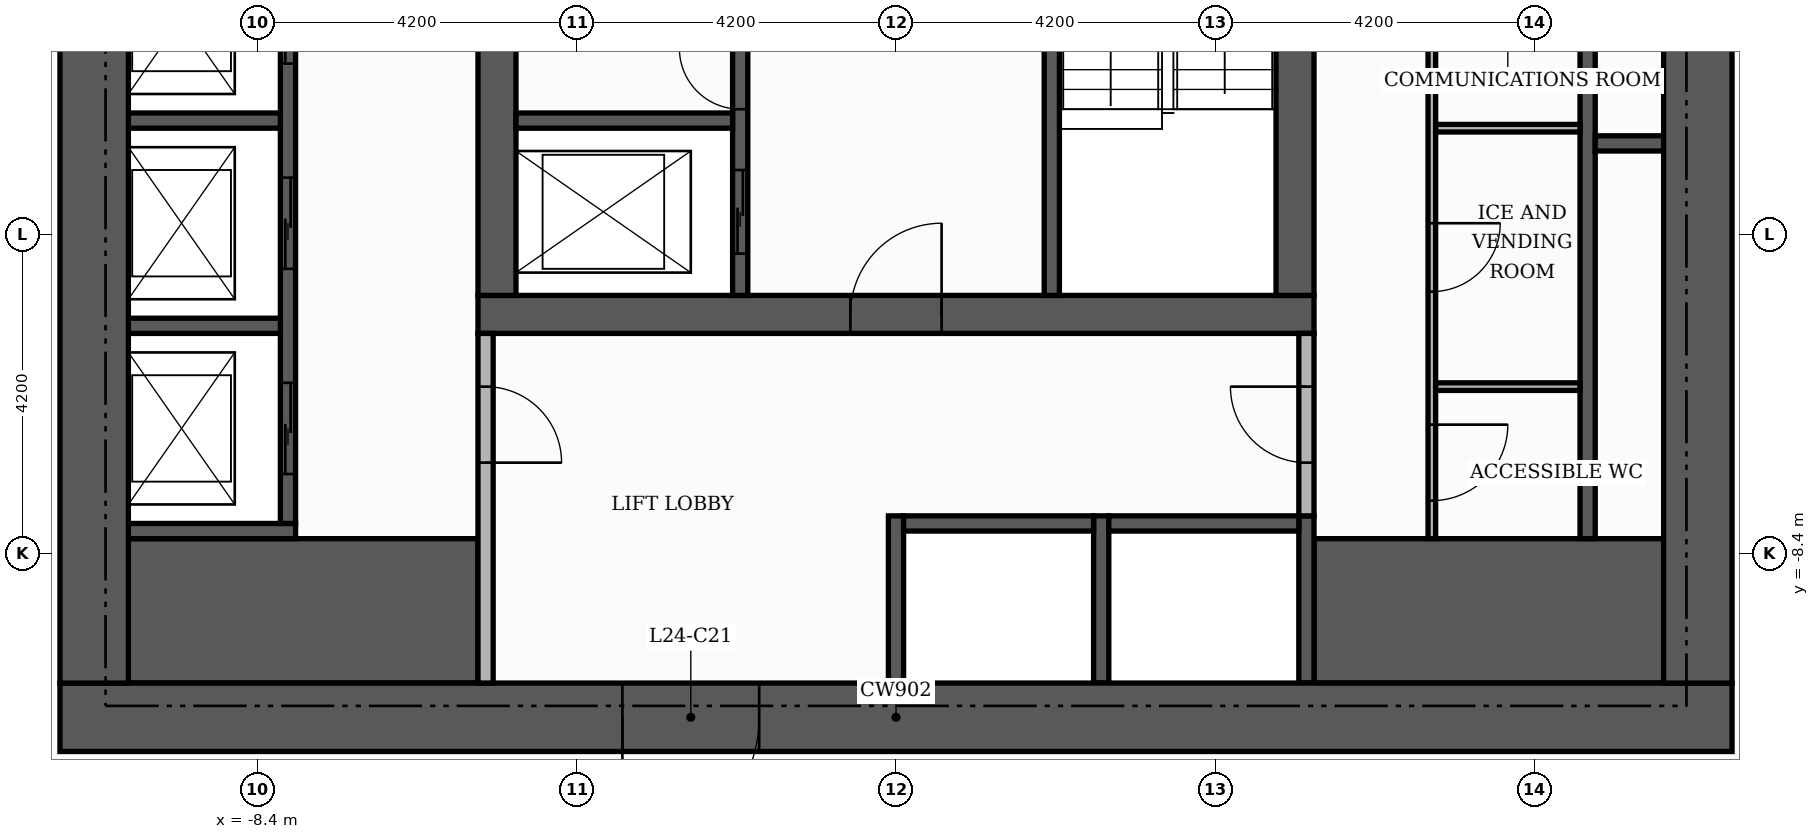
"""IFC4 building model, lengths in metres.
Left out: names, types, materials, properties, quantities, classifications, styles, units other than length and angle.
Written with IfcOpenShell. Run it as: python <this file> out.ifc"""

import sys

from ifc_helpers import new_model, si_unit, direction, frame, frame_2d, origin, place, context, subcontext, project, spatial, rectangle, extrude, element, fill, save


model = new_model("IFC4")
c1 = context("Model", 3, precision=1e-05, world=origin(), true_north=direction((0.0, 1.0)))
c2 = subcontext(c1, "Body", "Model", "MODEL_VIEW")
j1 = project(units=[si_unit("LENGTHUNIT", "METRE"), si_unit("PLANEANGLEUNIT", "RADIAN")], contexts=[c1])
p1 = place(None, origin())
s1 = spatial("IfcSite", under=j1, at=p1, CompositionType="ELEMENT")
p2 = place(p1, origin())
s2 = spatial("IfcBuilding", under=s1, at=p2, CompositionType="ELEMENT")
p3 = place(p2, frame((0.0, 0.0, 102.6)))
s3 = spatial("IfcBuildingStorey", under=s2, at=p3, CompositionType="ELEMENT", Elevation=102.6)
p4 = place(p3, frame((-5.5, -5.25, 0.0), z_axis=(0.0, 0.0, 1.0), x_axis=(1.0, 0.0, 0.0)))
e1 = element("IfcWall", 1, at=p4, inside=s3, PredefinedType="SHEAR", context=c2, shape_type="SweptSolid", body=[
    extrude(rectangle(XDim=11.0, YDim=0.5, at=frame_2d((5.5, 0.0))), origin(), (0.0, 0.0, 1.0), 3.48),
])
p5 = place(p4, frame((4.9, 0.0, 0.0)))
e2 = element("IfcOpeningElement", 2, at=p5, cuts=e1, PredefinedType="OPENING", context=c2, shape_type="SweptSolid", body=[
    extrude(rectangle(XDim=1.2, YDim=2.1, at=frame_2d((0.6, 1.05))), frame((0.0, 0.26, 0.0), z_axis=(0.0, -1.0, 0.0), x_axis=(1.0, 0.0, 0.0)), (0.0, 0.0, 1.0), 0.52),
])
for number, where, z_axis, x_axis in (
    (3, (-5.25, -5.0, 0.0), (0.0, 0.0, 1.0), (0.0, 1.0, 0.0)),
    (4, (5.25, -5.0, 0.0), (0.0, 0.0, 1.0), (0.0, 1.0, 0.0)),
):
    element("IfcWall", number, at=place(p3, frame(where, z_axis=z_axis, x_axis=x_axis)), inside=s3, PredefinedType="SHEAR", context=c2, shape_type="SweptSolid", body=[
        extrude(rectangle(XDim=10.5, YDim=0.5, at=frame_2d((5.25, 0.0))), origin(), (0.0, 0.0, 1.0), 3.48),
    ])
for number, where, z_axis, x_axis in (
    (5, (-10.1, -9.15, 0.0), (0.0, 0.0, 1.0), (1.0, 0.0, 0.0)),
    (6, (5.5, -9.15, 0.0), (0.0, 0.0, 1.0), (1.0, 0.0, 0.0)),
):
    element("IfcWall", number, at=place(p3, frame(where, z_axis=z_axis, x_axis=x_axis)), inside=s3, PredefinedType="SHEAR", context=c2, shape_type="SweptSolid", body=[
        extrude(rectangle(XDim=4.6, YDim=1.9, at=frame_2d((2.3, 0.0))), origin(), (0.0, 0.0, 1.0), 3.48),
    ])
p6 = place(p3, frame((2.05, -5.0, 0.0), z_axis=(0.0, 0.0, 1.0), x_axis=(0.0, 1.0, 0.0)))
e7 = element("IfcWall", 7, at=p6, inside=s3, PredefinedType="SHEAR", context=c2, shape_type="SweptSolid", body=[
    extrude(rectangle(XDim=6.6, YDim=0.2, at=frame_2d((3.3, 0.0))), origin(), (0.0, 0.0, 1.0), 3.48),
])
p7 = place(p6, frame((5.25, 0.0, 0.0)))
e8 = element("IfcOpeningElement", 8, at=p7, cuts=e7, PredefinedType="OPENING", context=c2, shape_type="SweptSolid", body=[
    extrude(rectangle(XDim=1.0, YDim=2.1, at=frame_2d((0.5, 1.05))), frame((0.0, 0.11, 0.0), z_axis=(0.0, -1.0, 0.0), x_axis=(1.0, 0.0, 0.0)), (0.0, 0.0, 1.0), 0.22),
])
for number, where, z_axis, x_axis in (
    (9, (0.0, -10.1, 0.0), (0.0, 0.0, 1.0), (0.0, 1.0, 0.0)),
    (10, (2.7, -10.1, 0.0), (0.0, 0.0, 1.0), (0.0, 1.0, 0.0)),
    (11, (5.4, -10.1, 0.0), (0.0, 0.0, 1.0), (0.0, 1.0, 0.0)),
    (12, (-10.1, -8.1, 0.0), (0.0, 0.0, 1.0), (1.0, 0.0, 0.0)),
):
    element("IfcWall", number, at=place(p3, frame(where, z_axis=z_axis, x_axis=x_axis)), inside=s3, PredefinedType="SHEAR", context=c2, shape_type="SweptSolid", body=[
        extrude(rectangle(XDim=2.2, YDim=0.2, at=frame_2d((1.1, 0.0))), origin(), (0.0, 0.0, 1.0), 3.48),
    ])
p8 = place(p3, frame((9.1, -8.2, 0.0), z_axis=(0.0, 0.0, 1.0), x_axis=(0.0, 1.0, 0.0)))
e13 = element("IfcWall", 13, at=p8, inside=s3, PredefinedType="SHEAR", context=c2, shape_type="SweptSolid", body=[
    extrude(rectangle(XDim=16.4, YDim=0.2, at=frame_2d((8.2, 0.0))), origin(), (0.0, 0.0, 1.0), 3.48),
])
for number, where, z_axis, x_axis in (
    (14, (0.1, -8.0, 0.0), (0.0, 0.0, 1.0), (1.0, 0.0, 0.0)),
    (15, (2.8, -8.0, 0.0), (0.0, 0.0, 1.0), (1.0, 0.0, 0.0)),
):
    element("IfcWall", number, at=place(p3, frame(where, z_axis=z_axis, x_axis=x_axis)), inside=s3, PredefinedType="SHEAR", context=c2, shape_type="SweptSolid", body=[
        extrude(rectangle(XDim=2.5, YDim=0.2, at=frame_2d((1.25, 0.0))), origin(), (0.0, 0.0, 1.0), 3.48),
    ])
p9 = place(p3, frame((-8.0, -8.0, 0.0), z_axis=(0.0, 0.0, 1.0), x_axis=(0.0, 1.0, 0.0)))
e16 = element("IfcWall", 16, at=p9, inside=s3, PredefinedType="SHEAR", context=c2, shape_type="SweptSolid", body=[
    extrude(rectangle(XDim=16.2, YDim=0.2, at=frame_2d((8.1, 0.0))), origin(), (0.0, 0.0, 1.0), 3.48),
])
p10 = place(p9, frame((0.65, 0.0, 0.0)))
e17 = element("IfcOpeningElement", 17, at=p10, cuts=e16, PredefinedType="OPENING", context=c2, shape_type="SweptSolid", body=[
    extrude(rectangle(XDim=1.2, YDim=2.1, at=frame_2d((0.6, 1.05))), frame((0.0, 0.11, 0.0), z_axis=(0.0, -1.0, 0.0), x_axis=(1.0, 0.0, 0.0)), (0.0, 0.0, 1.0), 0.22),
])
p11 = place(p9, frame((3.35, 0.0, 0.0)))
e18 = element("IfcOpeningElement", 18, at=p11, cuts=e16, PredefinedType="OPENING", context=c2, shape_type="SweptSolid", body=[
    extrude(rectangle(XDim=1.2, YDim=2.1, at=frame_2d((0.6, 1.05))), frame((0.0, 0.11, 0.0), z_axis=(0.0, -1.0, 0.0), x_axis=(1.0, 0.0, 0.0)), (0.0, 0.0, 1.0), 0.22),
])
p12 = place(p9, frame((6.05, 0.0, 0.0)))
e19 = element("IfcOpeningElement", 19, at=p12, cuts=e16, PredefinedType="OPENING", context=c2, shape_type="SweptSolid", body=[
    extrude(rectangle(XDim=1.2, YDim=2.1, at=frame_2d((0.6, 1.05))), frame((0.0, 0.11, 0.0), z_axis=(0.0, -1.0, 0.0), x_axis=(1.0, 0.0, 0.0)), (0.0, 0.0, 1.0), 0.22),
])
p13 = place(p9, frame((8.75, 0.0, 0.0)))
e20 = element("IfcOpeningElement", 20, at=p13, cuts=e16, PredefinedType="OPENING", context=c2, shape_type="SweptSolid", body=[
    extrude(rectangle(XDim=1.2, YDim=2.1, at=frame_2d((0.6, 1.05))), frame((0.0, 0.11, 0.0), z_axis=(0.0, -1.0, 0.0), x_axis=(1.0, 0.0, 0.0)), (0.0, 0.0, 1.0), 0.22),
])
p14 = place(p9, frame((11.45, 0.0, 0.0)))
e21 = element("IfcOpeningElement", 21, at=p14, cuts=e16, PredefinedType="OPENING", context=c2, shape_type="SweptSolid", body=[
    extrude(rectangle(XDim=1.2, YDim=2.1, at=frame_2d((0.6, 1.05))), frame((0.0, 0.11, 0.0), z_axis=(0.0, -1.0, 0.0), x_axis=(1.0, 0.0, 0.0)), (0.0, 0.0, 1.0), 0.22),
])
p15 = place(p9, frame((14.15, 0.0, 0.0)))
e22 = element("IfcOpeningElement", 22, at=p15, cuts=e16, PredefinedType="OPENING", context=c2, shape_type="SweptSolid", body=[
    extrude(rectangle(XDim=1.2, YDim=2.1, at=frame_2d((0.6, 1.05))), frame((0.0, 0.11, 0.0), z_axis=(0.0, -1.0, 0.0), x_axis=(1.0, 0.0, 0.0)), (0.0, 0.0, 1.0), 0.22),
])
p16 = place(p3, frame((-10.1, -5.4, 0.0), z_axis=(0.0, 0.0, 1.0), x_axis=(1.0, 0.0, 0.0)))
e23 = element("IfcWall", 23, at=p16, inside=s3, PredefinedType="SHEAR", context=c2, shape_type="SweptSolid", body=[
    extrude(rectangle(XDim=2.0, YDim=0.2, at=frame_2d((1.0, 0.0))), origin(), (0.0, 0.0, 1.0), 3.48),
])
p17 = place(p3, frame((-2.05, -5.0, 0.0), z_axis=(0.0, 0.0, 1.0), x_axis=(0.0, 1.0, 0.0)))
e24 = element("IfcWall", 24, at=p17, inside=s3, PredefinedType="SHEAR", context=c2, shape_type="SweptSolid", body=[
    extrude(rectangle(XDim=3.4, YDim=0.2, at=frame_2d((1.7, 0.0))), origin(), (0.0, 0.0, 1.0), 3.48),
])
p18 = place(p17, frame((0.55, 0.0, 0.0)))
e25 = element("IfcOpeningElement", 25, at=p18, cuts=e24, PredefinedType="OPENING", context=c2, shape_type="SweptSolid", body=[
    extrude(rectangle(XDim=1.1, YDim=2.1, at=frame_2d((0.55, 1.05))), frame((0.0, 0.11, 0.0), z_axis=(0.0, -1.0, 0.0), x_axis=(1.0, 0.0, 0.0)), (0.0, 0.0, 1.0), 0.22),
])
p19 = place(p17, frame((2.45, 0.0, 0.0)))
e26 = element("IfcOpeningElement", 26, at=p19, cuts=e24, PredefinedType="OPENING", context=c2, shape_type="SweptSolid", body=[
    extrude(rectangle(XDim=0.8, YDim=2.1, at=frame_2d((0.4, 1.05))), frame((0.0, 0.11, 0.0), z_axis=(0.0, -1.0, 0.0), x_axis=(1.0, 0.0, 0.0)), (0.0, 0.0, 1.0), 0.22),
])
p20 = place(p3, frame((9.2, -3.0, 0.0), z_axis=(0.0, 0.0, 1.0), x_axis=(1.0, 0.0, 0.0)))
e27 = element("IfcWall", 27, at=p20, inside=s3, PredefinedType="SHEAR", context=c2, shape_type="SweptSolid", body=[
    extrude(rectangle(XDim=0.9, YDim=0.2, at=frame_2d((0.45, 0.0))), origin(), (0.0, 0.0, 1.0), 3.48),
])
p21 = place(p3, frame((-10.1, -2.7, 0.0), z_axis=(0.0, 0.0, 1.0), x_axis=(1.0, 0.0, 0.0)))
e28 = element("IfcWall", 28, at=p21, inside=s3, PredefinedType="SHEAR", context=c2, shape_type="SweptSolid", body=[
    extrude(rectangle(XDim=2.0, YDim=0.2, at=frame_2d((1.0, 0.0))), origin(), (0.0, 0.0, 1.0), 3.48),
])
p22 = place(p3, frame((-5.0, -2.7, 0.0), z_axis=(0.0, 0.0, 1.0), x_axis=(1.0, 0.0, 0.0)))
e29 = element("IfcWall", 29, at=p22, inside=s3, PredefinedType="SHEAR", context=c2, shape_type="SweptSolid", body=[
    extrude(rectangle(XDim=2.85, YDim=0.2, at=frame_2d((1.425, 0.0))), origin(), (0.0, 0.0, 1.0), 3.48),
])
p23 = place(p3, frame((-11.0, -10.55, 0.0), z_axis=(0.0, 0.0, 1.0), x_axis=(1.0, 0.0, 0.0)))
e30 = element("IfcWall", 30, at=p23, inside=s3, PredefinedType="SHEAR", context=c2, shape_type="SweptSolid", body=[
    extrude(rectangle(XDim=22.0, YDim=0.9, at=frame_2d((11.0, 0.0))), origin(), (0.0, 0.0, 1.0), 3.48),
])
p24 = place(p23, frame((7.4, 0.0, 0.0)))
e31 = element("IfcOpeningElement", 31, at=p24, cuts=e30, PredefinedType="OPENING", context=c2, shape_type="SweptSolid", body=[
    extrude(rectangle(XDim=1.8, YDim=2.2, at=frame_2d((0.9, 1.1))), frame((0.0, 0.46, 0.0), z_axis=(0.0, -1.0, 0.0), x_axis=(1.0, 0.0, 0.0)), (0.0, 0.0, 1.0), 0.92),
])
for number, where, z_axis, x_axis in (
    (32, (-10.55, -10.1, 0.0), (0.0, 0.0, 1.0), (0.0, 1.0, 0.0)),
    (33, (10.55, -10.1, 0.0), (0.0, 0.0, 1.0), (0.0, 1.0, 0.0)),
):
    element("IfcWall", number, at=place(p3, frame(where, z_axis=z_axis, x_axis=x_axis)), inside=s3, PredefinedType="SHEAR", context=c2, shape_type="SweptSolid", body=[
        extrude(rectangle(XDim=20.2, YDim=0.9, at=frame_2d((10.1, 0.0))), origin(), (0.0, 0.0, 1.0), 3.48),
    ])
p25 = place(p3, frame((-5.4, -10.1, 0.0), z_axis=(0.0, 0.0, 1.0), x_axis=(0.0, 1.0, 0.0)))
e34 = element("IfcWall", 34, at=p25, inside=s3, PredefinedType="PARTITIONING", context=c2, shape_type="SweptSolid", body=[
    extrude(rectangle(XDim=4.6, YDim=0.2, at=frame_2d((2.3, 0.0))), origin(), (0.0, 0.0, 1.0), 3.48),
])
p26 = place(p25, frame((2.9, 0.0, 0.0)))
e35 = element("IfcOpeningElement", 35, at=p26, cuts=e34, PredefinedType="OPENING", context=c2, shape_type="SweptSolid", body=[
    extrude(rectangle(XDim=1.0, YDim=2.1, at=frame_2d((0.5, 1.05))), frame((0.0, 0.11, 0.0), z_axis=(0.0, -1.0, 0.0), x_axis=(1.0, 0.0, 0.0)), (0.0, 0.0, 1.0), 0.22),
])
p27 = place(p3, frame((7.05, -8.2, 0.0), z_axis=(0.0, 0.0, 1.0), x_axis=(0.0, 1.0, 0.0)))
e36 = element("IfcWall", 36, at=p27, inside=s3, PredefinedType="PARTITIONING", context=c2, shape_type="SweptSolid", body=[
    extrude(rectangle(XDim=16.4, YDim=0.1, at=frame_2d((8.2, 0.0))), origin(), (0.0, 0.0, 1.0), 3.48),
])
p28 = place(p27, frame((0.5, 0.0, 0.0)))
e37 = element("IfcOpeningElement", 37, at=p28, cuts=e36, PredefinedType="OPENING", context=c2, shape_type="SweptSolid", body=[
    extrude(rectangle(XDim=1.0, YDim=2.1, at=frame_2d((0.5, 1.05))), frame((0.0, 0.06, 0.0), z_axis=(0.0, -1.0, 0.0), x_axis=(1.0, 0.0, 0.0)), (0.0, 0.0, 1.0), 0.12),
])
p29 = place(p27, frame((3.25, 0.0, 0.0)))
e38 = element("IfcOpeningElement", 38, at=p29, cuts=e36, PredefinedType="OPENING", context=c2, shape_type="SweptSolid", body=[
    extrude(rectangle(XDim=0.9, YDim=2.1, at=frame_2d((0.45, 1.05))), frame((0.0, 0.06, 0.0), z_axis=(0.0, -1.0, 0.0), x_axis=(1.0, 0.0, 0.0)), (0.0, 0.0, 1.0), 0.12),
])
p30 = place(p27, frame((6.65, 0.0, 0.0)))
e39 = element("IfcOpeningElement", 39, at=p30, cuts=e36, PredefinedType="OPENING", context=c2, shape_type="SweptSolid", body=[
    extrude(rectangle(XDim=0.9, YDim=2.1, at=frame_2d((0.45, 1.05))), frame((0.0, 0.06, 0.0), z_axis=(0.0, -1.0, 0.0), x_axis=(1.0, 0.0, 0.0)), (0.0, 0.0, 1.0), 0.12),
])
p31 = place(p27, frame((10.15, 0.0, 0.0)))
e40 = element("IfcOpeningElement", 40, at=p31, cuts=e36, PredefinedType="OPENING", context=c2, shape_type="SweptSolid", body=[
    extrude(rectangle(XDim=0.9, YDim=2.1, at=frame_2d((0.45, 1.05))), frame((0.0, 0.06, 0.0), z_axis=(0.0, -1.0, 0.0), x_axis=(1.0, 0.0, 0.0)), (0.0, 0.0, 1.0), 0.12),
])
p32 = place(p27, frame((12.95, 0.0, 0.0)))
e41 = element("IfcOpeningElement", 41, at=p32, cuts=e36, PredefinedType="OPENING", context=c2, shape_type="SweptSolid", body=[
    extrude(rectangle(XDim=0.9, YDim=2.1, at=frame_2d((0.45, 1.05))), frame((0.0, 0.06, 0.0), z_axis=(0.0, -1.0, 0.0), x_axis=(1.0, 0.0, 0.0)), (0.0, 0.0, 1.0), 0.12),
])
p33 = place(p27, frame((14.95, 0.0, 0.0)))
e42 = element("IfcOpeningElement", 42, at=p33, cuts=e36, PredefinedType="OPENING", context=c2, shape_type="SweptSolid", body=[
    extrude(rectangle(XDim=0.9, YDim=2.1, at=frame_2d((0.45, 1.05))), frame((0.0, 0.06, 0.0), z_axis=(0.0, -1.0, 0.0), x_axis=(1.0, 0.0, 0.0)), (0.0, 0.0, 1.0), 0.12),
])
p34 = place(p3, frame((5.4, -7.9, 0.0), z_axis=(0.0, 0.0, 1.0), x_axis=(0.0, 1.0, 0.0)))
e43 = element("IfcWall", 43, at=p34, inside=s3, PredefinedType="PARTITIONING", context=c2, shape_type="SweptSolid", body=[
    extrude(rectangle(XDim=2.4, YDim=0.2, at=frame_2d((1.2, 0.0))), origin(), (0.0, 0.0, 1.0), 3.48),
])
p35 = place(p34, frame((0.7, 0.0, 0.0)))
e44 = element("IfcOpeningElement", 44, at=p35, cuts=e43, PredefinedType="OPENING", context=c2, shape_type="SweptSolid", body=[
    extrude(rectangle(XDim=1.0, YDim=2.1, at=frame_2d((0.5, 1.05))), frame((0.0, 0.11, 0.0), z_axis=(0.0, -1.0, 0.0), x_axis=(1.0, 0.0, 0.0)), (0.0, 0.0, 1.0), 0.22),
])
for number, where, z_axis, x_axis in (
    (45, (7.1, -6.2, 0.0), (0.0, 0.0, 1.0), (1.0, 0.0, 0.0)),
    (46, (7.1, -2.8, 0.0), (0.0, 0.0, 1.0), (1.0, 0.0, 0.0)),
):
    element("IfcWall", number, at=place(p3, frame(where, z_axis=z_axis, x_axis=x_axis)), inside=s3, PredefinedType="PARTITIONING", context=c2, shape_type="SweptSolid", body=[
        extrude(rectangle(XDim=1.9, YDim=0.1, at=frame_2d((0.95, 0.0))), origin(), (0.0, 0.0, 1.0), 3.48),
    ])
p36 = place(p10, origin())
e47 = element("IfcDoor", 47, at=p36, inside=s3, OperationType="SLIDING_TO_LEFT", PredefinedType="DOOR", context=c2, shape_type="SweptSolid", body=[
    extrude(rectangle(XDim=1.2, YDim=2.1, at=frame_2d((0.6, 1.05))), frame((0.0, 0.025, 0.0), z_axis=(0.0, -1.0, 0.0), x_axis=(1.0, 0.0, 0.0)), (0.0, 0.0, 1.0), 0.05),
])
fill(e17, e47)
p37 = place(p11, origin())
e48 = element("IfcDoor", 48, at=p37, inside=s3, OperationType="SLIDING_TO_LEFT", PredefinedType="DOOR", context=c2, shape_type="SweptSolid", body=[
    extrude(rectangle(XDim=1.2, YDim=2.1, at=frame_2d((0.6, 1.05))), frame((0.0, 0.025, 0.0), z_axis=(0.0, -1.0, 0.0), x_axis=(1.0, 0.0, 0.0)), (0.0, 0.0, 1.0), 0.05),
])
fill(e18, e48)
p38 = place(p12, origin())
e49 = element("IfcDoor", 49, at=p38, inside=s3, OperationType="SLIDING_TO_LEFT", PredefinedType="DOOR", context=c2, shape_type="SweptSolid", body=[
    extrude(rectangle(XDim=1.2, YDim=2.1, at=frame_2d((0.6, 1.05))), frame((0.0, 0.025, 0.0), z_axis=(0.0, -1.0, 0.0), x_axis=(1.0, 0.0, 0.0)), (0.0, 0.0, 1.0), 0.05),
])
fill(e19, e49)
p39 = place(p18, origin())
e50 = element("IfcDoor", 50, at=p39, inside=s3, OperationType="SLIDING_TO_LEFT", PredefinedType="DOOR", context=c2, shape_type="SweptSolid", body=[
    extrude(rectangle(XDim=1.1, YDim=2.1, at=frame_2d((0.55, 1.05))), frame((0.0, 0.025, 0.0), z_axis=(0.0, -1.0, 0.0), x_axis=(1.0, 0.0, 0.0)), (0.0, 0.0, 1.0), 0.05),
])
fill(e25, e50)
p40 = place(p19, origin())
e51 = element("IfcDoor", 51, at=p40, inside=s3, OperationType="SINGLE_SWING_RIGHT", PredefinedType="DOOR", context=c2, shape_type="SweptSolid", body=[
    extrude(rectangle(XDim=0.8, YDim=2.1, at=frame_2d((0.4, 1.05))), frame((0.0, 0.025, 0.0), z_axis=(0.0, -1.0, 0.0), x_axis=(1.0, 0.0, 0.0)), (0.0, 0.0, 1.0), 0.05),
])
fill(e26, e51)
p41 = place(p5, origin())
e52 = element("IfcDoor", 52, at=p41, inside=s3, OperationType="SINGLE_SWING_RIGHT", PredefinedType="DOOR", context=c2, shape_type="SweptSolid", body=[
    extrude(rectangle(XDim=1.2, YDim=2.1, at=frame_2d((0.6, 1.05))), frame((0.0, 0.025, 0.0), z_axis=(0.0, -1.0, 0.0), x_axis=(1.0, 0.0, 0.0)), (0.0, 0.0, 1.0), 0.05),
])
fill(e2, e52)
p42 = place(p26, frame((1.0, 0.0, 0.0), z_axis=(0.0, 0.0, 1.0), x_axis=(-1.0, 0.0, 0.0)))
e53 = element("IfcDoor", 53, at=p42, inside=s3, OperationType="SINGLE_SWING_LEFT", PredefinedType="DOOR", context=c2, shape_type="SweptSolid", body=[
    extrude(rectangle(XDim=1.0, YDim=2.1, at=frame_2d((0.5, 1.05))), frame((0.0, 0.025, 0.0), z_axis=(0.0, -1.0, 0.0), x_axis=(1.0, 0.0, 0.0)), (0.0, 0.0, 1.0), 0.05),
])
fill(e35, e53)
p43 = place(p35, origin())
e54 = element("IfcDoor", 54, at=p43, inside=s3, OperationType="SINGLE_SWING_RIGHT", PredefinedType="DOOR", context=c2, shape_type="SweptSolid", body=[
    extrude(rectangle(XDim=1.0, YDim=2.1, at=frame_2d((0.5, 1.05))), frame((0.0, 0.025, 0.0), z_axis=(0.0, -1.0, 0.0), x_axis=(1.0, 0.0, 0.0)), (0.0, 0.0, 1.0), 0.05),
])
fill(e44, e54)
p44 = place(p24, frame((1.8, 0.0, 0.0), z_axis=(0.0, 0.0, 1.0), x_axis=(-1.0, 0.0, 0.0)))
e55 = element("IfcDoor", 55, at=p44, inside=s3, OperationType="DOUBLE_DOOR_SINGLE_SWING", PredefinedType="DOOR", context=c2, shape_type="SweptSolid", body=[
    extrude(rectangle(XDim=1.8, YDim=2.2, at=frame_2d((0.9, 1.1))), frame((0.0, 0.025, 0.0), z_axis=(0.0, -1.0, 0.0), x_axis=(1.0, 0.0, 0.0)), (0.0, 0.0, 1.0), 0.05),
])
fill(e31, e55)
p45 = place(p28, frame((1.0, 0.0, 0.0), z_axis=(0.0, 0.0, 1.0), x_axis=(-1.0, 0.0, 0.0)))
e56 = element("IfcDoor", 56, at=p45, inside=s3, OperationType="SINGLE_SWING_RIGHT", PredefinedType="DOOR", context=c2, shape_type="SweptSolid", body=[
    extrude(rectangle(XDim=1.0, YDim=2.1, at=frame_2d((0.5, 1.05))), frame((0.0, 0.025, 0.0), z_axis=(0.0, -1.0, 0.0), x_axis=(1.0, 0.0, 0.0)), (0.0, 0.0, 1.0), 0.05),
])
fill(e37, e56)
p46 = place(p29, frame((0.9, 0.0, 0.0), z_axis=(0.0, 0.0, 1.0), x_axis=(-1.0, 0.0, 0.0)))
e57 = element("IfcDoor", 57, at=p46, inside=s3, OperationType="SINGLE_SWING_RIGHT", PredefinedType="DOOR", context=c2, shape_type="SweptSolid", body=[
    extrude(rectangle(XDim=0.9, YDim=2.1, at=frame_2d((0.45, 1.05))), frame((0.0, 0.025, 0.0), z_axis=(0.0, -1.0, 0.0), x_axis=(1.0, 0.0, 0.0)), (0.0, 0.0, 1.0), 0.05),
])
fill(e38, e57)
save(model, sys.argv[1])
